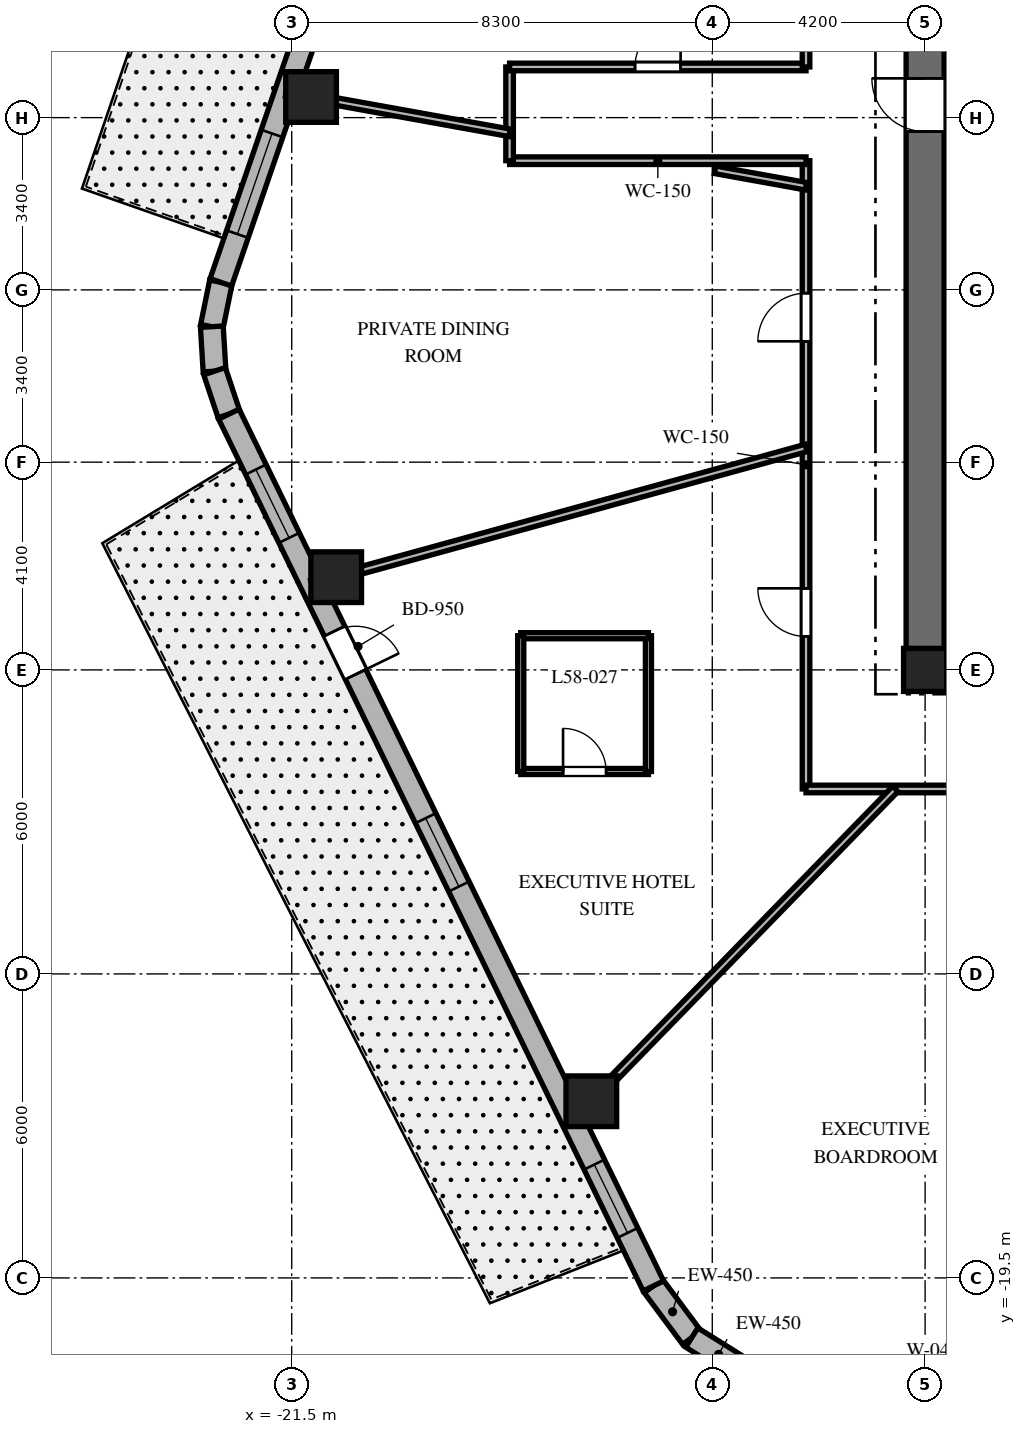
"""IFC4 building model, lengths in metres.
Left out: names, types, materials, properties, quantities, classifications, styles, units other than length and angle.
Written with IfcOpenShell. Run it as: python <this file> out.ifc"""

import sys

from ifc_helpers import new_model, si_unit, direction, frame, frame_2d, origin, origin_2d, place, context, subcontext, project, spatial, rectangle, extrude, element, fill, save


model = new_model("IFC4")
c1 = context("Model", 3, precision=1e-05, world=origin(), true_north=direction((0.0, 1.0)))
c2 = subcontext(c1, "Body", "Model", "MODEL_VIEW")
j1 = project(units=[si_unit("LENGTHUNIT", "METRE"), si_unit("PLANEANGLEUNIT", "RADIAN")], contexts=[c1])
p1 = place(None, origin())
s1 = spatial("IfcSite", under=j1, at=p1, CompositionType="ELEMENT")
p2 = place(p1, origin())
s2 = spatial("IfcBuilding", under=s1, at=p2, CompositionType="ELEMENT")
p3 = place(p2, frame((0.0, 0.0, 233.1)))
s3 = spatial("IfcBuildingStorey", under=s2, at=p3, CompositionType="ELEMENT", Elevation=233.1)
p4 = place(p3, frame((-9.375, -7.5, 0.0), z_axis=(0.0, 0.0, 1.0), x_axis=(1.0, 0.0, 0.0)))
e1 = element("IfcWall", 1, at=p4, inside=s3, PredefinedType="SHEAR", context=c2, shape_type="SweptSolid", body=[
    extrude(rectangle(XDim=18.75, YDim=0.75, at=frame_2d((9.375, 0.0))), origin(), (0.0, 0.0, 1.0), 3.8),
])
p5 = place(p4, frame((9.425, 0.0, 0.0)))
e2 = element("IfcOpeningElement", 2, at=p5, cuts=e1, PredefinedType="OPENING", context=c2, shape_type="SweptSolid", body=[
    extrude(rectangle(XDim=1.0, YDim=2.15, at=frame_2d((0.5, 1.075))), frame((0.0, 0.385, 0.0), z_axis=(0.0, -1.0, 0.0), x_axis=(1.0, 0.0, 0.0)), (0.0, 0.0, 1.0), 0.77),
])
p6 = place(p3, frame((-9.0, -7.125, 0.0), z_axis=(0.0, 0.0, 1.0), x_axis=(0.0, 1.0, 0.0)))
e3 = element("IfcWall", 3, at=p6, inside=s3, PredefinedType="SHEAR", context=c2, shape_type="SweptSolid", body=[
    extrude(rectangle(XDim=14.25, YDim=0.75, at=frame_2d((7.125, 0.0))), origin(), (0.0, 0.0, 1.0), 3.8),
])
p7 = place(p6, frame((10.25, 0.0, 0.0)))
e4 = element("IfcOpeningElement", 4, at=p7, cuts=e3, PredefinedType="OPENING", context=c2, shape_type="SweptSolid", body=[
    extrude(rectangle(XDim=1.05, YDim=2.15, at=frame_2d((0.525, 1.075))), frame((0.0, 0.385, 0.0), z_axis=(0.0, -1.0, 0.0), x_axis=(1.0, 0.0, 0.0)), (0.0, 0.0, 1.0), 0.77),
])
p8 = place(p3, frame((-9.0, -7.5, 0.0), z_axis=(0.0, 0.0, 1.0), x_axis=(1.0, 0.0, 0.0)))
e5 = element("IfcColumn", 5, at=p8, inside=s3, PredefinedType="COLUMN", context=c2, shape_type="SweptSolid", body=[
    extrude(rectangle(XDim=0.85, YDim=0.85, at=origin_2d()), origin(), (0.0, 0.0, 1.0), 3.8),
])
for number, where, z_axis, x_axis in (
    (6, (-21.118, 3.807, 0.0), (0.0, 0.0, 1.0), (1.0, 0.0, 0.0)),
    (7, (-20.622, -5.67, 0.0), (0.0, 0.0, 1.0), (1.0, 0.0, 0.0)),
    (8, (-15.587, -16.013, 0.0), (0.0, 0.0, 1.0), (1.0, 0.0, 0.0)),
):
    element("IfcColumn", number, at=place(p3, frame(where, z_axis=z_axis, x_axis=x_axis)), inside=s3, PredefinedType="COLUMN", context=c2, shape_type="SweptSolid", body=[
        extrude(rectangle(XDim=1.0, YDim=1.0, at=origin_2d()), origin(), (0.0, 0.0, 1.0), 3.8),
    ])
p9 = place(p3, frame((-14.362, -19.658, 0.0), z_axis=(0.0, 0.0, 1.0), x_axis=(0.596642462792, -0.80250717853, 0.0)))
e9 = element("IfcWall", 9, at=p9, inside=s3, PredefinedType="SOLIDWALL", context=c2, shape_type="SweptSolid", body=[
    extrude(rectangle(XDim=1.27, YDim=0.45, at=frame_2d((0.635, 0.0))), origin(), (0.0, 0.0, 1.0), 3.5),
])
p10 = place(p3, frame((-13.604, -20.678, 0.0), z_axis=(0.0, 0.0, 1.0), x_axis=(0.847910404124, -0.53013955387, 0.0)))
e10 = element("IfcWall", 10, at=p10, inside=s3, PredefinedType="SOLIDWALL", context=c2, shape_type="SweptSolid", body=[
    extrude(rectangle(XDim=1.249, YDim=0.45, at=frame_2d((0.624, 0.0))), origin(), (0.0, 0.0, 1.0), 3.5),
])
p11 = place(p3, frame((-22.898, 0.15, 0.0), z_axis=(0.0, 0.0, 1.0), x_axis=(-0.199055826889, -0.979988151858, 0.0)))
e11 = element("IfcWall", 11, at=p11, inside=s3, PredefinedType="SOLIDWALL", context=c2, shape_type="SweptSolid", body=[
    extrude(rectangle(XDim=0.894, YDim=0.45, at=frame_2d((0.447, 0.0))), origin(), (0.0, 0.0, 1.0), 3.5),
])
p12 = place(p3, frame((-23.076, -0.727, 0.0), z_axis=(0.0, 0.0, 1.0), x_axis=(0.060805222108, -0.998149650586, 0.0)))
e12 = element("IfcWall", 12, at=p12, inside=s3, PredefinedType="SOLIDWALL", context=c2, shape_type="SweptSolid", body=[
    extrude(rectangle(XDim=0.879, YDim=0.45, at=frame_2d((0.44, 0.0))), origin(), (0.0, 0.0, 1.0), 3.5),
])
p13 = place(p3, frame((-23.023, -1.604, 0.0), z_axis=(0.0, 0.0, 1.0), x_axis=(0.316801227695, -0.948491951537, 0.0)))
e13 = element("IfcWall", 13, at=p13, inside=s3, PredefinedType="SOLIDWALL", context=c2, shape_type="SweptSolid", body=[
    extrude(rectangle(XDim=0.894, YDim=0.45, at=frame_2d((0.447, 0.0))), origin(), (0.0, 0.0, 1.0), 3.5),
])
p14 = place(p3, frame((-16.324, 19.275, 0.0), z_axis=(0.0, 0.0, 1.0), x_axis=(-0.325083142304, -0.945685439557, 0.0)))
e14 = element("IfcWall", 14, at=p14, inside=s3, PredefinedType="SOLIDWALL", context=c2, shape_type="SweptSolid", body=[
    extrude(rectangle(XDim=20.224, YDim=0.45, at=frame_2d((10.112, 0.0))), origin(), (0.0, 0.0, 1.0), 3.5),
])
p15 = place(p14, frame((5.062, 0.0, 0.0)))
e15 = element("IfcOpeningElement", 15, at=p15, cuts=e14, PredefinedType="OPENING", context=c2, shape_type="SweptSolid", body=[
    extrude(rectangle(XDim=1.0, YDim=2.15, at=frame_2d((0.5, 1.075))), frame((0.0, 0.235, 0.0), z_axis=(0.0, -1.0, 0.0), x_axis=(1.0, 0.0, 0.0)), (0.0, 0.0, 1.0), 0.47),
])
p16 = place(p14, frame((0.953, 0.0, 0.8)))
e16 = element("IfcOpeningElement", 16, at=p16, cuts=e14, PredefinedType="OPENING", context=c2, shape_type="SweptSolid", body=[
    extrude(rectangle(XDim=2.1, YDim=1.85, at=frame_2d((1.05, 0.925))), frame((0.0, 0.235, 0.0), z_axis=(0.0, -1.0, 0.0), x_axis=(1.0, 0.0, 0.0)), (0.0, 0.0, 1.0), 0.47),
])
p17 = place(p14, frame((6.604, 0.0, 0.8)))
e17 = element("IfcOpeningElement", 17, at=p17, cuts=e14, PredefinedType="OPENING", context=c2, shape_type="SweptSolid", body=[
    extrude(rectangle(XDim=2.1, YDim=1.85, at=frame_2d((1.05, 0.925))), frame((0.0, 0.235, 0.0), z_axis=(0.0, -1.0, 0.0), x_axis=(1.0, 0.0, 0.0)), (0.0, 0.0, 1.0), 0.47),
])
p18 = place(p14, frame((11.585, 0.0, 0.8)))
e18 = element("IfcOpeningElement", 18, at=p18, cuts=e14, PredefinedType="OPENING", context=c2, shape_type="SweptSolid", body=[
    extrude(rectangle(XDim=2.1, YDim=1.85, at=frame_2d((1.05, 0.925))), frame((0.0, 0.235, 0.0), z_axis=(0.0, -1.0, 0.0), x_axis=(1.0, 0.0, 0.0)), (0.0, 0.0, 1.0), 0.47),
])
p19 = place(p14, frame((17.118, 0.0, 0.8)))
e19 = element("IfcOpeningElement", 19, at=p19, cuts=e14, PredefinedType="OPENING", context=c2, shape_type="SweptSolid", body=[
    extrude(rectangle(XDim=2.1, YDim=1.85, at=frame_2d((1.05, 0.925))), frame((0.0, 0.235, 0.0), z_axis=(0.0, -1.0, 0.0), x_axis=(1.0, 0.0, 0.0)), (0.0, 0.0, 1.0), 0.47),
])
p20 = place(p3, frame((-22.74, -2.452, 0.0), z_axis=(0.0, 0.0, 1.0), x_axis=(0.437753424814, -0.899095066755, 0.0)))
e20 = element("IfcWall", 20, at=p20, inside=s3, PredefinedType="SOLIDWALL", context=c2, shape_type="SweptSolid", body=[
    extrude(rectangle(XDim=19.137, YDim=0.45, at=frame_2d((9.569, 0.0))), origin(), (0.0, 0.0, 1.0), 3.5),
])
p21 = place(p20, frame((4.763, 0.0, 0.0)))
e21 = element("IfcOpeningElement", 21, at=p21, cuts=e20, PredefinedType="OPENING", context=c2, shape_type="SweptSolid", body=[
    extrude(rectangle(XDim=0.95, YDim=2.15, at=frame_2d((0.475, 1.075))), frame((0.0, 0.235, 0.0), z_axis=(0.0, -1.0, 0.0), x_axis=(1.0, 0.0, 0.0)), (0.0, 0.0, 1.0), 0.47),
])
p22 = place(p20, frame((1.216, 0.0, 0.8)))
e22 = element("IfcOpeningElement", 22, at=p22, cuts=e20, PredefinedType="OPENING", context=c2, shape_type="SweptSolid", body=[
    extrude(rectangle(XDim=1.5, YDim=1.8, at=frame_2d((0.75, 0.9))), frame((0.0, 0.235, 0.0), z_axis=(0.0, -1.0, 0.0), x_axis=(1.0, 0.0, 0.0)), (0.0, 0.0, 1.0), 0.47),
])
p23 = place(p20, frame((8.87, 0.0, 0.8)))
e23 = element("IfcOpeningElement", 23, at=p23, cuts=e20, PredefinedType="OPENING", context=c2, shape_type="SweptSolid", body=[
    extrude(rectangle(XDim=1.5, YDim=1.8, at=frame_2d((0.75, 0.9))), frame((0.0, 0.235, 0.0), z_axis=(0.0, -1.0, 0.0), x_axis=(1.0, 0.0, 0.0)), (0.0, 0.0, 1.0), 0.47),
])
p24 = place(p20, frame((16.473, 0.0, 0.8)))
e24 = element("IfcOpeningElement", 24, at=p24, cuts=e20, PredefinedType="OPENING", context=c2, shape_type="SweptSolid", body=[
    extrude(rectangle(XDim=1.5, YDim=1.8, at=frame_2d((0.75, 0.9))), frame((0.0, 0.235, 0.0), z_axis=(0.0, -1.0, 0.0), x_axis=(1.0, 0.0, 0.0)), (0.0, 0.0, 1.0), 0.47),
])
p25 = place(p3, frame((-11.35, -9.85, 0.0), z_axis=(0.0, 0.0, 1.0), x_axis=(0.0, 1.0, 0.0)))
e25 = element("IfcWall", 25, at=p25, inside=s3, PredefinedType="PARTITIONING", context=c2, shape_type="SweptSolid", body=[
    extrude(rectangle(XDim=12.4, YDim=0.15, at=frame_2d((6.2, 0.0))), origin(), (0.0, 0.0, 1.0), 2.99),
])
p26 = place(p25, frame((8.835, 0.0, 0.0)))
e26 = element("IfcOpeningElement", 26, at=p26, cuts=e25, PredefinedType="OPENING", context=c2, shape_type="SweptSolid", body=[
    extrude(rectangle(XDim=0.95, YDim=2.03, at=frame_2d((0.475, 1.015))), frame((0.0, 0.085, 0.0), z_axis=(0.0, -1.0, 0.0), x_axis=(1.0, 0.0, 0.0)), (0.0, 0.0, 1.0), 0.17),
])
p27 = place(p25, frame((3.01, 0.0, 0.0)))
e27 = element("IfcOpeningElement", 27, at=p27, cuts=e25, PredefinedType="OPENING", context=c2, shape_type="SweptSolid", body=[
    extrude(rectangle(XDim=0.95, YDim=2.03, at=frame_2d((0.475, 1.015))), frame((0.0, 0.085, 0.0), z_axis=(0.0, -1.0, 0.0), x_axis=(1.0, 0.0, 0.0)), (0.0, 0.0, 1.0), 0.17),
])
p28 = place(p3, frame((-11.35, 2.55, 0.0), z_axis=(0.0, 0.0, 1.0), x_axis=(-1.0, 0.0, 0.0)))
e28 = element("IfcWall", 28, at=p28, inside=s3, PredefinedType="PARTITIONING", context=c2, shape_type="SweptSolid", body=[
    extrude(rectangle(XDim=5.85, YDim=0.15, at=frame_2d((2.925, 0.0))), origin(), (0.0, 0.0, 1.0), 2.94),
])
p29 = place(p3, frame((-17.2, 2.55, 0.0), z_axis=(0.0, 0.0, 1.0), x_axis=(0.0, 1.0, 0.0)))
e29 = element("IfcWall", 29, at=p29, inside=s3, PredefinedType="PARTITIONING", context=c2, shape_type="SweptSolid", body=[
    extrude(rectangle(XDim=1.85, YDim=0.15, at=frame_2d((0.925, 0.0))), origin(), (0.0, 0.0, 1.0), 2.94),
])
p30 = place(p3, frame((-17.2, 4.4, 0.0), z_axis=(0.0, 0.0, 1.0), x_axis=(1.0, 0.0, 0.0)))
e30 = element("IfcWall", 30, at=p30, inside=s3, PredefinedType="PARTITIONING", context=c2, shape_type="SweptSolid", body=[
    extrude(rectangle(XDim=5.85, YDim=0.15, at=frame_2d((2.925, 0.0))), origin(), (0.0, 0.0, 1.0), 2.94),
])
p31 = place(p30, frame((2.475, 0.0, 0.0)))
e31 = element("IfcOpeningElement", 31, at=p31, cuts=e30, PredefinedType="OPENING", context=c2, shape_type="SweptSolid", body=[
    extrude(rectangle(XDim=0.9, YDim=2.03, at=frame_2d((0.45, 1.015))), frame((0.0, 0.085, 0.0), z_axis=(0.0, -1.0, 0.0), x_axis=(1.0, 0.0, 0.0)), (0.0, 0.0, 1.0), 0.17),
])
p32 = place(p3, frame((-11.35, 4.4, 0.0), z_axis=(0.0, 0.0, 1.0), x_axis=(0.0, 1.0, 0.0)))
e32 = element("IfcWall", 32, at=p32, inside=s3, PredefinedType="PARTITIONING", context=c2, shape_type="SweptSolid", body=[
    extrude(rectangle(XDim=5.45, YDim=0.15, at=frame_2d((2.725, 0.0))), origin(), (0.0, 0.0, 1.0), 2.99),
])
p33 = place(p32, frame((2.955, 0.0, 0.0)))
e33 = element("IfcOpeningElement", 33, at=p33, cuts=e32, PredefinedType="OPENING", context=c2, shape_type="SweptSolid", body=[
    extrude(rectangle(XDim=0.9, YDim=2.03, at=frame_2d((0.45, 1.015))), frame((0.0, 0.085, 0.0), z_axis=(0.0, -1.0, 0.0), x_axis=(1.0, 0.0, 0.0)), (0.0, 0.0, 1.0), 0.17),
])
p34 = place(p3, frame((-0.92, -9.85, 0.0), z_axis=(0.0, 0.0, 1.0), x_axis=(-1.0, 0.0, 0.0)))
e34 = element("IfcWall", 34, at=p34, inside=s3, PredefinedType="PARTITIONING", context=c2, shape_type="SweptSolid", body=[
    extrude(rectangle(XDim=10.43, YDim=0.15, at=frame_2d((5.215, 0.0))), origin(), (0.0, 0.0, 1.0), 2.99),
])
p35 = place(p34, frame((4.949, 0.0, 0.0)))
e35 = element("IfcOpeningElement", 35, at=p35, cuts=e34, PredefinedType="OPENING", context=c2, shape_type="SweptSolid", body=[
    extrude(rectangle(XDim=0.95, YDim=2.03, at=frame_2d((0.475, 1.015))), frame((0.0, 0.085, 0.0), z_axis=(0.0, -1.0, 0.0), x_axis=(1.0, 0.0, 0.0)), (0.0, 0.0, 1.0), 0.17),
])
p36 = place(p3, frame((-11.35, 2.046, 0.0), z_axis=(0.0, 0.0, 1.0), x_axis=(-0.984127783205, 0.177461281195, 0.0)))
e36 = element("IfcWall", 36, at=p36, inside=s3, PredefinedType="PARTITIONING", context=c2, shape_type="SweptSolid", body=[
    extrude(rectangle(XDim=1.826, YDim=0.15, at=frame_2d((0.913, 0.0))), origin(), (0.0, 0.0, 1.0), 3.5),
])
p37 = place(p3, frame((-17.2, 3.101, 0.0), z_axis=(0.0, 0.0, 1.0), x_axis=(-0.98413465883, 0.177423147559, 0.0)))
e37 = element("IfcWall", 37, at=p37, inside=s3, PredefinedType="PARTITIONING", context=c2, shape_type="SweptSolid", body=[
    extrude(rectangle(XDim=4.482, YDim=0.15, at=frame_2d((2.241, 0.0))), origin(), (0.0, 0.0, 1.0), 2.74),
])
p38 = place(p3, frame((-11.35, -3.121, 0.0), z_axis=(0.0, 0.0, 1.0), x_axis=(-0.964212793822, -0.265129568758, 0.0)))
e38 = element("IfcWall", 38, at=p38, inside=s3, PredefinedType="PARTITIONING", context=c2, shape_type="SweptSolid", body=[
    extrude(rectangle(XDim=10.12, YDim=0.15, at=frame_2d((5.06, 0.0))), origin(), (0.0, 0.0, 1.0), 2.74),
])
p39 = place(p3, frame((-9.588, -9.85, 0.0), z_axis=(0.0, 0.0, 1.0), x_axis=(-0.697519469595, -0.716565830567, 0.0)))
e39 = element("IfcWall", 39, at=p39, inside=s3, PredefinedType="PARTITIONING", context=c2, shape_type="SweptSolid", body=[
    extrude(rectangle(XDim=9.126, YDim=0.15, at=frame_2d((4.563, 0.0))), origin(), (0.0, 0.0, 1.0), 2.74),
])
p40 = place(p3, frame((-16.98, -9.505, 0.0), z_axis=(0.0, 0.0, 1.0), x_axis=(1.0, 0.0, 0.0)))
e40 = element("IfcWall", 40, at=p40, inside=s3, PredefinedType="PARTITIONING", context=c2, shape_type="SweptSolid", body=[
    extrude(rectangle(XDim=2.52, YDim=0.12, at=frame_2d((1.26, 0.0))), origin(), (0.0, 0.0, 1.0), 3.026),
])
p41 = place(p40, frame((0.835, 0.0, 0.0)))
e41 = element("IfcOpeningElement", 41, at=p41, cuts=e40, PredefinedType="OPENING", context=c2, shape_type="SweptSolid", body=[
    extrude(rectangle(XDim=0.85, YDim=2.03, at=frame_2d((0.425, 1.015))), frame((0.0, 0.07, 0.0), z_axis=(0.0, -1.0, 0.0), x_axis=(1.0, 0.0, 0.0)), (0.0, 0.0, 1.0), 0.14),
])
p42 = place(p3, frame((-14.46, -9.505, 0.0), z_axis=(0.0, 0.0, 1.0), x_axis=(0.0, 1.0, 0.0)))
e42 = element("IfcWall", 42, at=p42, inside=s3, PredefinedType="PARTITIONING", context=c2, shape_type="SweptSolid", body=[
    extrude(rectangle(XDim=2.68, YDim=0.12, at=frame_2d((1.34, 0.0))), origin(), (0.0, 0.0, 1.0), 3.5),
])
p43 = place(p3, frame((-14.46, -6.825, 0.0), z_axis=(0.0, 0.0, 1.0), x_axis=(-1.0, 0.0, 0.0)))
e43 = element("IfcWall", 43, at=p43, inside=s3, PredefinedType="PARTITIONING", context=c2, shape_type="SweptSolid", body=[
    extrude(rectangle(XDim=2.52, YDim=0.12, at=frame_2d((1.26, 0.0))), origin(), (0.0, 0.0, 1.0), 3.026),
])
p44 = place(p3, frame((-16.98, -6.825, 0.0), z_axis=(0.0, 0.0, 1.0), x_axis=(0.0, -1.0, 0.0)))
e44 = element("IfcWall", 44, at=p44, inside=s3, PredefinedType="PARTITIONING", context=c2, shape_type="SweptSolid", body=[
    extrude(rectangle(XDim=2.68, YDim=0.12, at=frame_2d((1.34, 0.0))), origin(), (0.0, 0.0, 1.0), 3.5),
])
p45 = place(p19, origin())
e45 = element("IfcWindow", 45, at=p45, inside=s3, PartitioningType="SINGLE_PANEL", PredefinedType="WINDOW", context=c2, shape_type="SweptSolid", body=[
    extrude(rectangle(XDim=2.1, YDim=1.85, at=frame_2d((1.05, 0.925))), frame((0.0, 0.03, 0.0), z_axis=(0.0, -1.0, 0.0), x_axis=(1.0, 0.0, 0.0)), (0.0, 0.0, 1.0), 0.06),
])
fill(e19, e45)
p46 = place(p21, origin())
e46 = element("IfcDoor", 46, at=p46, inside=s3, OperationType="SINGLE_SWING_RIGHT", PredefinedType="DOOR", context=c2, shape_type="SweptSolid", body=[
    extrude(rectangle(XDim=0.95, YDim=2.15, at=frame_2d((0.475, 1.075))), frame((0.0, 0.025, 0.0), z_axis=(0.0, -1.0, 0.0), x_axis=(1.0, 0.0, 0.0)), (0.0, 0.0, 1.0), 0.05),
])
fill(e21, e46)
p47 = place(p22, origin())
e47 = element("IfcWindow", 47, at=p47, inside=s3, PartitioningType="SINGLE_PANEL", PredefinedType="WINDOW", context=c2, shape_type="SweptSolid", body=[
    extrude(rectangle(XDim=1.5, YDim=1.8, at=frame_2d((0.75, 0.9))), frame((0.0, 0.03, 0.0), z_axis=(0.0, -1.0, 0.0), x_axis=(1.0, 0.0, 0.0)), (0.0, 0.0, 1.0), 0.06),
])
fill(e22, e47)
p48 = place(p23, origin())
e48 = element("IfcWindow", 48, at=p48, inside=s3, PartitioningType="SINGLE_PANEL", PredefinedType="WINDOW", context=c2, shape_type="SweptSolid", body=[
    extrude(rectangle(XDim=1.5, YDim=1.8, at=frame_2d((0.75, 0.9))), frame((0.0, 0.03, 0.0), z_axis=(0.0, -1.0, 0.0), x_axis=(1.0, 0.0, 0.0)), (0.0, 0.0, 1.0), 0.06),
])
fill(e23, e48)
p49 = place(p24, origin())
e49 = element("IfcWindow", 49, at=p49, inside=s3, PartitioningType="SINGLE_PANEL", PredefinedType="WINDOW", context=c2, shape_type="SweptSolid", body=[
    extrude(rectangle(XDim=1.5, YDim=1.8, at=frame_2d((0.75, 0.9))), frame((0.0, 0.03, 0.0), z_axis=(0.0, -1.0, 0.0), x_axis=(1.0, 0.0, 0.0)), (0.0, 0.0, 1.0), 0.06),
])
fill(e24, e49)
p50 = place(p7, origin())
e50 = element("IfcDoor", 50, at=p50, inside=s3, OperationType="SINGLE_SWING_RIGHT", PredefinedType="DOOR", context=c2, shape_type="SweptSolid", body=[
    extrude(rectangle(XDim=1.05, YDim=2.15, at=frame_2d((0.525, 1.075))), frame((0.0, 0.025, 0.0), z_axis=(0.0, -1.0, 0.0), x_axis=(1.0, 0.0, 0.0)), (0.0, 0.0, 1.0), 0.05),
])
fill(e4, e50)
p51 = place(p31, origin())
e51 = element("IfcDoor", 51, at=p51, inside=s3, OperationType="SINGLE_SWING_RIGHT", PredefinedType="DOOR", context=c2, shape_type="SweptSolid", body=[
    extrude(rectangle(XDim=0.9, YDim=2.03, at=frame_2d((0.45, 1.015))), frame((0.0, 0.025, 0.0), z_axis=(0.0, -1.0, 0.0), x_axis=(1.0, 0.0, 0.0)), (0.0, 0.0, 1.0), 0.05),
])
fill(e31, e51)
p52 = place(p26, origin())
e52 = element("IfcDoor", 52, at=p52, inside=s3, OperationType="SINGLE_SWING_LEFT", PredefinedType="DOOR", context=c2, shape_type="SweptSolid", body=[
    extrude(rectangle(XDim=0.95, YDim=2.03, at=frame_2d((0.475, 1.015))), frame((0.0, 0.025, 0.0), z_axis=(0.0, -1.0, 0.0), x_axis=(1.0, 0.0, 0.0)), (0.0, 0.0, 1.0), 0.05),
])
fill(e26, e52)
p53 = place(p27, origin())
e53 = element("IfcDoor", 53, at=p53, inside=s3, OperationType="SINGLE_SWING_RIGHT", PredefinedType="DOOR", context=c2, shape_type="SweptSolid", body=[
    extrude(rectangle(XDim=0.95, YDim=2.03, at=frame_2d((0.475, 1.015))), frame((0.0, 0.025, 0.0), z_axis=(0.0, -1.0, 0.0), x_axis=(1.0, 0.0, 0.0)), (0.0, 0.0, 1.0), 0.05),
])
fill(e27, e53)
p54 = place(p41, origin())
e54 = element("IfcDoor", 54, at=p54, inside=s3, OperationType="SINGLE_SWING_LEFT", PredefinedType="DOOR", context=c2, shape_type="SweptSolid", body=[
    extrude(rectangle(XDim=0.85, YDim=2.03, at=frame_2d((0.425, 1.015))), frame((0.0, 0.025, 0.0), z_axis=(0.0, -1.0, 0.0), x_axis=(1.0, 0.0, 0.0)), (0.0, 0.0, 1.0), 0.05),
])
fill(e41, e54)
save(model, sys.argv[1])
